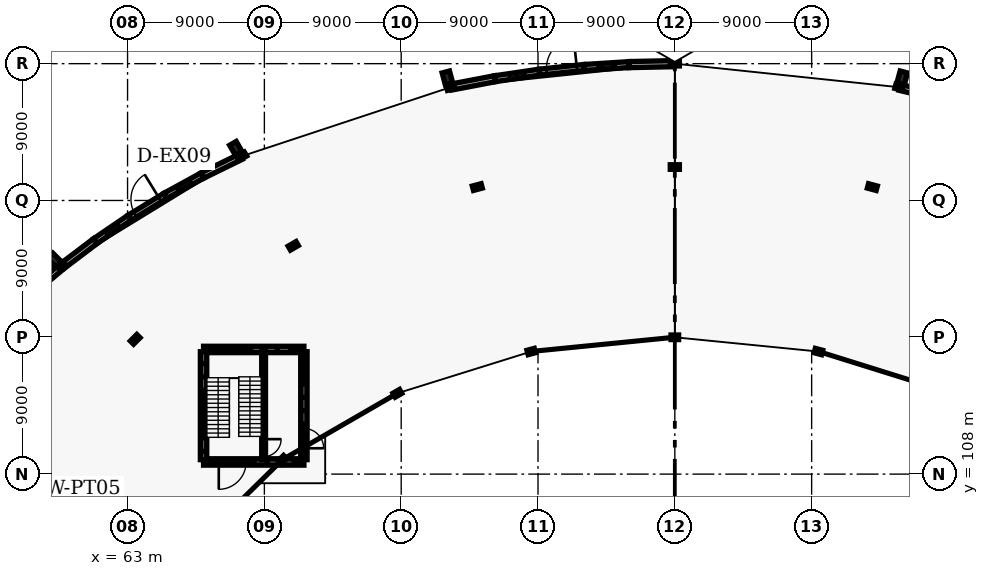
"""IFC4 building model, lengths in metres.
Left out: names, types, materials, properties, quantities, classifications, styles, units other than length and angle.
Written with IfcOpenShell. Run it as: python <this file> out.ifc"""

import sys

from ifc_helpers import new_model, si_unit, direction, frame, frame_2d, origin, origin_2d, place, context, subcontext, project, spatial, rectangle, i_section, extrude, element, fill, save


model = new_model("IFC4")
c1 = context("Model", 3, precision=1e-05, world=origin(), true_north=direction((0.0, 1.0)))
c2 = subcontext(c1, "Body", "Model", "MODEL_VIEW")
j1 = project(units=[si_unit("LENGTHUNIT", "METRE"), si_unit("PLANEANGLEUNIT", "RADIAN")], contexts=[c1])
p1 = place(None, origin())
s1 = spatial("IfcSite", under=j1, at=p1, CompositionType="ELEMENT")
p2 = place(p1, origin())
s2 = spatial("IfcBuilding", under=s1, at=p2, CompositionType="ELEMENT")
p3 = place(p2, origin())
s3 = spatial("IfcBuildingStorey", under=s2, at=p3, CompositionType="ELEMENT", Elevation=0.0)
p4 = place(p3, frame((108.447, 116.063, 0.0), z_axis=(0.0, 0.0, 1.0), x_axis=(0.258819045103, 0.965925826289, 0.0)))
e1 = element("IfcColumn", 1, at=p4, inside=s3, PredefinedType="COLUMN", context=c2, shape_type="SweptSolid", body=[
    extrude(i_section(OverallWidth=0.3, OverallDepth=0.5, WebThickness=0.014, FlangeThickness=0.028, FilletRadius=0.027, at=origin_2d()), origin(), (0.0, 0.0, 1.0), 5.4),
])
p5 = place(p3, frame((111.993, 126.881, 0.0), z_axis=(0.0, 0.0, 1.0), x_axis=(0.258819045103, 0.965925826289, 0.0)))
e2 = element("IfcColumn", 2, at=p5, inside=s3, PredefinedType="COLUMN", context=c2, shape_type="SweptSolid", body=[
    extrude(i_section(OverallWidth=0.3, OverallDepth=0.6, WebThickness=0.015, FlangeThickness=0.03, FilletRadius=0.027, at=origin_2d()), origin(), (0.0, 0.0, 1.0), 5.4),
])
p6 = place(p3, frame((113.753, 133.45, 0.0), z_axis=(0.0, 0.0, 1.0), x_axis=(0.258819045103, 0.965925826289, 0.0)))
e3 = element("IfcColumn", 3, at=p6, inside=s3, PredefinedType="COLUMN", context=c2, shape_type="SweptSolid", body=[
    extrude(i_section(OverallWidth=0.3, OverallDepth=0.5, WebThickness=0.014, FlangeThickness=0.028, FilletRadius=0.027, at=origin_2d()), origin(), (0.0, 0.0, 1.0), 5.4),
])
p7 = place(p3, frame((113.96, 134.066, 0.0), z_axis=(0.0, 0.0, 1.0), x_axis=(0.258819045103, 0.965925826289, 0.0)))
e4 = element("IfcColumn", 4, at=p7, inside=s3, PredefinedType="PILASTER", context=c2, shape_type="SweptSolid", body=[
    extrude(rectangle(XDim=0.8, YDim=0.5, at=origin_2d()), origin(), (0.0, 0.0, 1.0), 5.15),
])
p8 = place(p3, frame((99.0, 117.0, 0.0), z_axis=(0.0, 0.0, 1.0), x_axis=(0.0, 1.0, 0.0)))
e5 = element("IfcColumn", 5, at=p8, inside=s3, PredefinedType="COLUMN", context=c2, shape_type="SweptSolid", body=[
    extrude(i_section(OverallWidth=0.3, OverallDepth=0.5, WebThickness=0.014, FlangeThickness=0.028, FilletRadius=0.027, at=origin_2d()), origin(), (0.0, 0.0, 1.0), 5.4),
])
for number, where, z_axis, x_axis in (
    (6, (99.0, 128.2, 0.0), (0.0, 0.0, 1.0), (0.0, 1.0, 0.0)),
    (7, (99.0, 135.0, 0.0), (0.0, 0.0, 1.0), (0.0, 1.0, 0.0)),
):
    element("IfcColumn", number, at=place(p3, frame(where, z_axis=z_axis, x_axis=x_axis)), inside=s3, PredefinedType="COLUMN", context=c2, shape_type="SweptSolid", body=[
        extrude(i_section(OverallWidth=0.3, OverallDepth=0.6, WebThickness=0.015, FlangeThickness=0.03, FilletRadius=0.027, at=origin_2d()), origin(), (0.0, 0.0, 1.0), 5.4),
    ])
p9 = place(p3, frame((99.0, 135.65, 0.0), z_axis=(0.0, 0.0, 1.0), x_axis=(0.0, 1.0, 0.0)))
e8 = element("IfcColumn", 8, at=p9, inside=s3, PredefinedType="PILASTER", context=c2, shape_type="SweptSolid", body=[
    extrude(rectangle(XDim=0.75, YDim=0.5, at=origin_2d()), origin(), (0.0, 0.0, 1.0), 5.15),
])
p10 = place(p3, frame((89.553, 116.063, 0.0), z_axis=(0.0, 0.0, 1.0), x_axis=(-0.258819045103, 0.965925826289, 0.0)))
e9 = element("IfcColumn", 9, at=p10, inside=s3, PredefinedType="COLUMN", context=c2, shape_type="SweptSolid", body=[
    extrude(i_section(OverallWidth=0.3, OverallDepth=0.5, WebThickness=0.014, FlangeThickness=0.028, FilletRadius=0.027, at=origin_2d()), origin(), (0.0, 0.0, 1.0), 5.4),
])
p11 = place(p3, frame((86.007, 126.881, 0.0), z_axis=(0.0, 0.0, 1.0), x_axis=(-0.258819045103, 0.965925826289, 0.0)))
e10 = element("IfcColumn", 10, at=p11, inside=s3, PredefinedType="COLUMN", context=c2, shape_type="SweptSolid", body=[
    extrude(i_section(OverallWidth=0.3, OverallDepth=0.6, WebThickness=0.015, FlangeThickness=0.03, FilletRadius=0.027, at=origin_2d()), origin(), (0.0, 0.0, 1.0), 5.4),
])
p12 = place(p3, frame((84.247, 133.45, 0.0), z_axis=(0.0, 0.0, 1.0), x_axis=(-0.258819045103, 0.965925826289, 0.0)))
e11 = element("IfcColumn", 11, at=p12, inside=s3, PredefinedType="COLUMN", context=c2, shape_type="SweptSolid", body=[
    extrude(i_section(OverallWidth=0.3, OverallDepth=0.5, WebThickness=0.014, FlangeThickness=0.028, FilletRadius=0.027, at=origin_2d()), origin(), (0.0, 0.0, 1.0), 5.4),
])
p13 = place(p3, frame((84.04, 134.066, 0.0), z_axis=(0.0, 0.0, 1.0), x_axis=(-0.258819045103, 0.965925826289, 0.0)))
e12 = element("IfcColumn", 12, at=p13, inside=s3, PredefinedType="PILASTER", context=c2, shape_type="SweptSolid", body=[
    extrude(rectangle(XDim=0.8, YDim=0.5, at=origin_2d()), origin(), (0.0, 0.0, 1.0), 5.15),
])
p14 = place(p3, frame((80.75, 113.316, 0.0), z_axis=(0.0, 0.0, 1.0), x_axis=(-0.5, 0.866025403784, 0.0)))
e13 = element("IfcColumn", 13, at=p14, inside=s3, PredefinedType="COLUMN", context=c2, shape_type="SweptSolid", body=[
    extrude(i_section(OverallWidth=0.3, OverallDepth=0.5, WebThickness=0.014, FlangeThickness=0.028, FilletRadius=0.027, at=origin_2d()), origin(), (0.0, 0.0, 1.0), 5.4),
])
for number, where, z_axis, x_axis in (
    (14, (73.9, 123.015, 0.0), (0.0, 0.0, 1.0), (-0.5, 0.866, 0.0)),
    (15, (70.5, 128.904, 0.0), (0.0, 0.0, 1.0), (-0.5, 0.866, 0.0)),
):
    element("IfcColumn", number, at=place(p3, frame(where, z_axis=z_axis, x_axis=x_axis)), inside=s3, PredefinedType="COLUMN", context=c2, shape_type="SweptSolid", body=[
        extrude(i_section(OverallWidth=0.3, OverallDepth=0.6, WebThickness=0.015, FlangeThickness=0.03, FilletRadius=0.027, at=origin_2d()), origin(), (0.0, 0.0, 1.0), 5.4),
    ])
p15 = place(p3, frame((70.119, 129.431, 0.0), z_axis=(0.0, 0.0, 1.0), x_axis=(-0.5, 0.866025403784, 0.0)))
e16 = element("IfcColumn", 16, at=p15, inside=s3, PredefinedType="PILASTER", context=c2, shape_type="SweptSolid", body=[
    extrude(rectangle(XDim=0.75, YDim=0.5, at=origin_2d()), origin(), (0.0, 0.0, 1.0), 5.15),
])
p16 = place(p3, frame((73.191, 108.945, 0.0), z_axis=(0.0, 0.0, 1.0), x_axis=(-0.707106781187, 0.707106781187, 0.0)))
e17 = element("IfcColumn", 17, at=p16, inside=s3, PredefinedType="COLUMN", context=c2, shape_type="SweptSolid", body=[
    extrude(i_section(OverallWidth=0.3, OverallDepth=0.5, WebThickness=0.014, FlangeThickness=0.028, FilletRadius=0.027, at=origin_2d()), origin(), (0.0, 0.0, 1.0), 5.4),
])
p17 = place(p3, frame((63.503, 116.865, 0.0), z_axis=(0.0, 0.0, 1.0), x_axis=(-0.707106781187, 0.707106781187, 0.0)))
e18 = element("IfcColumn", 18, at=p17, inside=s3, PredefinedType="COLUMN", context=c2, shape_type="SweptSolid", body=[
    extrude(i_section(OverallWidth=0.3, OverallDepth=0.6, WebThickness=0.015, FlangeThickness=0.03, FilletRadius=0.027, at=origin_2d()), origin(), (0.0, 0.0, 1.0), 5.4),
])
p18 = place(p3, frame((58.695, 121.673, 0.0), z_axis=(0.0, 0.0, 1.0), x_axis=(-0.707106781187, 0.707106781187, 0.0)))
e19 = element("IfcColumn", 19, at=p18, inside=s3, PredefinedType="COLUMN", context=c2, shape_type="SweptSolid", body=[
    extrude(i_section(OverallWidth=0.3, OverallDepth=0.5, WebThickness=0.014, FlangeThickness=0.028, FilletRadius=0.027, at=origin_2d()), origin(), (0.0, 0.0, 1.0), 5.4),
])
p19 = place(p3, frame((58.187, 122.079, 0.0), z_axis=(0.0, 0.0, 1.0), x_axis=(-0.707106781187, 0.707106781187, 0.0)))
e20 = element("IfcColumn", 20, at=p19, inside=s3, PredefinedType="PILASTER", context=c2, shape_type="SweptSolid", body=[
    extrude(rectangle(XDim=0.8, YDim=0.5, at=origin_2d()), origin(), (0.0, 0.0, 1.0), 5.15),
])
p20 = place(p3, frame((116.637, 132.767, 0.0), z_axis=(0.0, 0.0, 1.0), x_axis=(-0.973061058114, 0.230547559481, 0.0)))
e21 = element("IfcWall", 21, at=p20, inside=s3, PredefinedType="SOLIDWALL", context=c2, shape_type="SweptSolid", body=[
    extrude(rectangle(XDim=2.923, YDim=0.4, at=frame_2d((1.461, 0.0))), origin(), (0.0, 0.0, 1.0), 4.6),
])
p21 = place(p3, frame((98.96, 135.0, 0.0), z_axis=(0.0, 0.0, 1.0), x_axis=(-0.999774733997, -0.021224543847, 0.0)))
e22 = element("IfcWall", 22, at=p21, inside=s3, PredefinedType="SOLIDWALL", context=c2, shape_type="SweptSolid", body=[
    extrude(rectangle(XDim=2.968, YDim=0.4, at=frame_2d((1.484, 0.0))), origin(), (0.0, 0.0, 1.0), 4.6),
])
p22 = place(p3, frame((95.993, 134.937, 0.0), z_axis=(0.0, 0.0, 1.0), x_axis=(-0.998008759952, -0.063075471132, 0.0)))
e23 = element("IfcWall", 23, at=p22, inside=s3, PredefinedType="SOLIDWALL", context=c2, shape_type="SweptSolid", body=[
    extrude(rectangle(XDim=2.965, YDim=0.39, at=frame_2d((1.482, 0.0))), origin(), (0.0, 0.0, 1.0), 4.6),
])
p23 = place(p22, frame((0.882, 0.0, 0.95)))
e24 = element("IfcOpeningElement", 24, at=p23, cuts=e23, PredefinedType="OPENING", context=c2, shape_type="SweptSolid", body=[
    extrude(rectangle(XDim=1.2, YDim=1.8, at=frame_2d((0.6, 0.9))), frame((0.0, 0.205, 0.0), z_axis=(0.0, -1.0, 0.0), x_axis=(1.0, 0.0, 0.0)), (0.0, 0.0, 1.0), 0.41),
])
p24 = place(p3, frame((93.034, 134.75, 0.0), z_axis=(0.0, 0.0, 1.0), x_axis=(-0.994529838675, -0.10445286011, 0.0)))
e25 = element("IfcWall", 25, at=p24, inside=s3, PredefinedType="SOLIDWALL", context=c2, shape_type="SweptSolid", body=[
    extrude(rectangle(XDim=2.959, YDim=0.39, at=frame_2d((1.479, 0.0))), origin(), (0.0, 0.0, 1.0), 4.6),
])
p25 = place(p24, frame((0.48, 0.0, 0.0)))
e26 = element("IfcOpeningElement", 26, at=p25, cuts=e25, PredefinedType="OPENING", context=c2, shape_type="SweptSolid", body=[
    extrude(rectangle(XDim=2.0, YDim=2.3, at=frame_2d((1.0, 1.15))), frame((0.0, 0.205, 0.0), z_axis=(0.0, -1.0, 0.0), x_axis=(1.0, 0.0, 0.0)), (0.0, 0.0, 1.0), 0.41),
])
p26 = place(p3, frame((90.091, 134.441, 0.0), z_axis=(0.0, 0.0, 1.0), x_axis=(-0.98927134979, -0.146089686444, 0.0)))
e27 = element("IfcWall", 27, at=p26, inside=s3, PredefinedType="SOLIDWALL", context=c2, shape_type="SweptSolid", body=[
    extrude(rectangle(XDim=2.95, YDim=0.39, at=frame_2d((1.475, 0.0))), origin(), (0.0, 0.0, 1.0), 4.6),
])
p27 = place(p26, frame((0.925, 0.0, 0.95)))
e28 = element("IfcOpeningElement", 28, at=p27, cuts=e27, PredefinedType="OPENING", context=c2, shape_type="SweptSolid", body=[
    extrude(rectangle(XDim=1.1, YDim=1.65, at=frame_2d((0.55, 0.825))), frame((0.0, 0.205, 0.0), z_axis=(0.0, -1.0, 0.0), x_axis=(1.0, 0.0, 0.0)), (0.0, 0.0, 1.0), 0.41),
])
p28 = place(p3, frame((87.173, 134.01, 0.0), z_axis=(0.0, 0.0, 1.0), x_axis=(-0.982209662349, -0.187787590612, 0.0)))
e29 = element("IfcWall", 29, at=p28, inside=s3, PredefinedType="SOLIDWALL", context=c2, shape_type="SweptSolid", body=[
    extrude(rectangle(XDim=2.939, YDim=0.4, at=frame_2d((1.47, 0.0))), origin(), (0.0, 0.0, 1.0), 4.6),
])
p29 = place(p3, frame((70.463, 128.887, 0.0), z_axis=(0.0, 0.0, 1.0), x_axis=(-0.898004688797, -0.439985884886, 0.0)))
e30 = element("IfcWall", 30, at=p29, inside=s3, PredefinedType="SOLIDWALL", context=c2, shape_type="SweptSolid", body=[
    extrude(rectangle(XDim=2.816, YDim=0.4, at=frame_2d((1.408, 0.0))), origin(), (0.0, 0.0, 1.0), 4.6),
])
p30 = place(p3, frame((67.934, 127.648, 0.0), z_axis=(0.0, 0.0, 1.0), x_axis=(-0.876631400762, -0.481162537193, 0.0)))
e31 = element("IfcWall", 31, at=p30, inside=s3, PredefinedType="SOLIDWALL", context=c2, shape_type="SweptSolid", body=[
    extrude(rectangle(XDim=2.789, YDim=0.39, at=frame_2d((1.395, 0.0))), origin(), (0.0, 0.0, 1.0), 4.6),
])
p31 = place(p30, frame((0.845, 0.0, 0.95)))
e32 = element("IfcOpeningElement", 32, at=p31, cuts=e31, PredefinedType="OPENING", context=c2, shape_type="SweptSolid", body=[
    extrude(rectangle(XDim=1.1, YDim=1.65, at=frame_2d((0.55, 0.825))), frame((0.0, 0.205, 0.0), z_axis=(0.0, -1.0, 0.0), x_axis=(1.0, 0.0, 0.0)), (0.0, 0.0, 1.0), 0.41),
])
p32 = place(p3, frame((65.489, 126.306, 0.0), z_axis=(0.0, 0.0, 1.0), x_axis=(-0.852743581926, -0.522329765075, 0.0)))
e33 = element("IfcWall", 33, at=p32, inside=s3, PredefinedType="SOLIDWALL", context=c2, shape_type="SweptSolid", body=[
    extrude(rectangle(XDim=2.76, YDim=0.39, at=frame_2d((1.38, 0.0))), origin(), (0.0, 0.0, 1.0), 4.6),
])
p33 = place(p32, frame((0.43, 0.0, 0.0)))
e34 = element("IfcOpeningElement", 34, at=p33, cuts=e33, PredefinedType="OPENING", context=c2, shape_type="SweptSolid", body=[
    extrude(rectangle(XDim=1.9, YDim=2.25, at=frame_2d((0.95, 1.125))), frame((0.0, 0.205, 0.0), z_axis=(0.0, -1.0, 0.0), x_axis=(1.0, 0.0, 0.0)), (0.0, 0.0, 1.0), 0.41),
])
p34 = place(p3, frame((63.135, 124.864, 0.0), z_axis=(0.0, 0.0, 1.0), x_axis=(-0.826422172457, -0.563050968271, 0.0)))
e35 = element("IfcWall", 35, at=p34, inside=s3, PredefinedType="SOLIDWALL", context=c2, shape_type="SweptSolid", body=[
    extrude(rectangle(XDim=2.73, YDim=0.39, at=frame_2d((1.365, 0.0))), origin(), (0.0, 0.0, 1.0), 4.6),
])
p35 = place(p34, frame((0.84, 0.0, 0.95)))
e36 = element("IfcOpeningElement", 36, at=p35, cuts=e35, PredefinedType="OPENING", context=c2, shape_type="SweptSolid", body=[
    extrude(rectangle(XDim=1.05, YDim=1.35, at=frame_2d((0.525, 0.675))), frame((0.0, 0.205, 0.0), z_axis=(0.0, -1.0, 0.0), x_axis=(1.0, 0.0, 0.0)), (0.0, 0.0, 1.0), 0.41),
])
p36 = place(p3, frame((60.879, 123.327, 0.0), z_axis=(0.0, 0.0, 1.0), x_axis=(-0.797585068324, -0.603206481054, 0.0)))
e37 = element("IfcWall", 37, at=p36, inside=s3, PredefinedType="SOLIDWALL", context=c2, shape_type="SweptSolid", body=[
    extrude(rectangle(XDim=2.7, YDim=0.4, at=frame_2d((1.35, 0.0))), origin(), (0.0, 0.0, 1.0), 4.6),
])
p37 = place(p3, frame((58.663, 121.648, 0.0), z_axis=(0.0, 0.0, 1.0), x_axis=(-0.76486611794, -0.644189274691, 0.0)))
e38 = element("IfcWall", 38, at=p37, inside=s3, PredefinedType="SOLIDWALL", context=c2, shape_type="SweptSolid", body=[
    extrude(rectangle(XDim=2.668, YDim=0.4, at=frame_2d((1.334, 0.0))), origin(), (0.0, 0.0, 1.0), 4.6),
])
p38 = place(p3, frame((68.0, 108.8, 0.0), z_axis=(0.0, 0.0, 1.0), x_axis=(1.0, 0.0, 0.0)))
e39 = element("IfcWall", 39, at=p38, inside=s3, PredefinedType="SHEAR", context=c2, shape_type="SweptSolid", body=[
    extrude(rectangle(XDim=6.6, YDim=0.42, at=frame_2d((3.3, 0.0))), origin(), (0.0, 0.0, 1.0), 5.4),
])
p39 = place(p38, frame((1.0, 0.0, 0.0)))
e40 = element("IfcOpeningElement", 40, at=p39, cuts=e39, PredefinedType="OPENING", context=c2, shape_type="SweptSolid", body=[
    extrude(rectangle(XDim=1.8, YDim=2.15, at=frame_2d((0.9, 1.075))), frame((0.0, 0.22, 0.0), z_axis=(0.0, -1.0, 0.0), x_axis=(1.0, 0.0, 0.0)), (0.0, 0.0, 1.0), 0.44),
])
p40 = place(p3, frame((68.0, 116.2, 0.0), z_axis=(0.0, 0.0, 1.0), x_axis=(1.0, 0.0, 0.0)))
e41 = element("IfcWall", 41, at=p40, inside=s3, PredefinedType="SHEAR", context=c2, shape_type="SweptSolid", body=[
    extrude(rectangle(XDim=6.6, YDim=0.42, at=frame_2d((3.3, 0.0))), origin(), (0.0, 0.0, 1.0), 5.4),
])
p41 = place(p3, frame((68.0, 108.95, 0.0), z_axis=(0.0, 0.0, 1.0), x_axis=(0.0, 1.0, 0.0)))
e42 = element("IfcWall", 42, at=p41, inside=s3, PredefinedType="SHEAR", context=c2, shape_type="SweptSolid", body=[
    extrude(rectangle(XDim=7.1, YDim=0.42, at=frame_2d((3.55, 0.0))), origin(), (0.0, 0.0, 1.0), 5.4),
])
p42 = place(p3, frame((74.6, 108.95, 0.0), z_axis=(0.0, 0.0, 1.0), x_axis=(0.0, 1.0, 0.0)))
e43 = element("IfcWall", 43, at=p42, inside=s3, PredefinedType="SHEAR", context=c2, shape_type="SweptSolid", body=[
    extrude(rectangle(XDim=7.1, YDim=0.42, at=frame_2d((3.55, 0.0))), origin(), (0.0, 0.0, 1.0), 5.4),
])
p43 = place(p42, frame((0.75, 0.0, 0.0)))
e44 = element("IfcOpeningElement", 44, at=p43, cuts=e43, PredefinedType="OPENING", context=c2, shape_type="SweptSolid", body=[
    extrude(rectangle(XDim=1.3, YDim=2.15, at=frame_2d((0.65, 1.075))), frame((0.0, 0.22, 0.0), z_axis=(0.0, -1.0, 0.0), x_axis=(1.0, 0.0, 0.0)), (0.0, 0.0, 1.0), 0.44),
])
p44 = place(p3, frame((71.95, 108.95, 0.0), z_axis=(0.0, 0.0, 1.0), x_axis=(0.0, 1.0, 0.0)))
e45 = element("IfcWall", 45, at=p44, inside=s3, PredefinedType="SHEAR", context=c2, shape_type="SweptSolid", body=[
    extrude(rectangle(XDim=7.1, YDim=0.25, at=frame_2d((3.55, 0.0))), origin(), (0.0, 0.0, 1.0), 5.4),
])
p45 = place(p44, frame((0.2, 0.0, 0.0)))
e46 = element("IfcOpeningElement", 46, at=p45, cuts=e45, PredefinedType="OPENING", context=c2, shape_type="SweptSolid", body=[
    extrude(rectangle(XDim=1.15, YDim=2.15, at=frame_2d((0.575, 1.075))), frame((0.0, 0.135, 0.0), z_axis=(0.0, -1.0, 0.0), x_axis=(1.0, 0.0, 0.0)), (0.0, 0.0, 1.0), 0.27),
])
p46 = place(p23, origin())
e47 = element("IfcWindow", 47, at=p46, inside=s3, PartitioningType="SINGLE_PANEL", PredefinedType="WINDOW", context=c2, shape_type="SweptSolid", body=[
    extrude(rectangle(XDim=1.2, YDim=1.8, at=frame_2d((0.6, 0.9))), frame((0.0, 0.03, 0.0), z_axis=(0.0, -1.0, 0.0), x_axis=(1.0, 0.0, 0.0)), (0.0, 0.0, 1.0), 0.06),
])
fill(e24, e47)
p47 = place(p25, frame((2.0, 0.0, 0.0), z_axis=(0.0, 0.0, 1.0), x_axis=(-1.0, 0.0, 0.0)))
e48 = element("IfcDoor", 48, at=p47, inside=s3, OperationType="DOUBLE_DOOR_SINGLE_SWING", PredefinedType="DOOR", context=c2, shape_type="SweptSolid", body=[
    extrude(rectangle(XDim=2.0, YDim=2.3, at=frame_2d((1.0, 1.15))), frame((0.0, 0.025, 0.0), z_axis=(0.0, -1.0, 0.0), x_axis=(1.0, 0.0, 0.0)), (0.0, 0.0, 1.0), 0.05),
])
fill(e26, e48)
p48 = place(p27, origin())
e49 = element("IfcWindow", 49, at=p48, inside=s3, PartitioningType="SINGLE_PANEL", PredefinedType="WINDOW", context=c2, shape_type="SweptSolid", body=[
    extrude(rectangle(XDim=1.1, YDim=1.65, at=frame_2d((0.55, 0.825))), frame((0.0, 0.03, 0.0), z_axis=(0.0, -1.0, 0.0), x_axis=(1.0, 0.0, 0.0)), (0.0, 0.0, 1.0), 0.06),
])
fill(e28, e49)
p49 = place(p31, origin())
e50 = element("IfcWindow", 50, at=p49, inside=s3, PartitioningType="SINGLE_PANEL", PredefinedType="WINDOW", context=c2, shape_type="SweptSolid", body=[
    extrude(rectangle(XDim=1.1, YDim=1.65, at=frame_2d((0.55, 0.825))), frame((0.0, 0.03, 0.0), z_axis=(0.0, -1.0, 0.0), x_axis=(1.0, 0.0, 0.0)), (0.0, 0.0, 1.0), 0.06),
])
fill(e32, e50)
p50 = place(p33, frame((1.9, 0.0, 0.0), z_axis=(0.0, 0.0, 1.0), x_axis=(-1.0, 0.0, 0.0)))
e51 = element("IfcDoor", 51, at=p50, inside=s3, OperationType="DOUBLE_DOOR_SINGLE_SWING", PredefinedType="DOOR", context=c2, shape_type="SweptSolid", body=[
    extrude(rectangle(XDim=1.9, YDim=2.25, at=frame_2d((0.95, 1.125))), frame((0.0, 0.025, 0.0), z_axis=(0.0, -1.0, 0.0), x_axis=(1.0, 0.0, 0.0)), (0.0, 0.0, 1.0), 0.05),
])
fill(e34, e51)
p51 = place(p35, origin())
e52 = element("IfcWindow", 52, at=p51, inside=s3, PartitioningType="SINGLE_PANEL", PredefinedType="WINDOW", context=c2, shape_type="SweptSolid", body=[
    extrude(rectangle(XDim=1.05, YDim=1.35, at=frame_2d((0.525, 0.675))), frame((0.0, 0.03, 0.0), z_axis=(0.0, -1.0, 0.0), x_axis=(1.0, 0.0, 0.0)), (0.0, 0.0, 1.0), 0.06),
])
fill(e36, e52)
p52 = place(p43, frame((1.3, 0.0, 0.0), z_axis=(0.0, 0.0, 1.0), x_axis=(-1.0, 0.0, 0.0)))
e53 = element("IfcDoor", 53, at=p52, inside=s3, OperationType="DOUBLE_DOOR_SINGLE_SWING", PredefinedType="DOOR", context=c2, shape_type="SweptSolid", body=[
    extrude(rectangle(XDim=1.3, YDim=2.15, at=frame_2d((0.65, 1.075))), frame((0.0, 0.025, 0.0), z_axis=(0.0, -1.0, 0.0), x_axis=(1.0, 0.0, 0.0)), (0.0, 0.0, 1.0), 0.05),
])
fill(e44, e53)
p53 = place(p45, origin())
e54 = element("IfcDoor", 54, at=p53, inside=s3, OperationType="SINGLE_SWING_RIGHT", PredefinedType="DOOR", context=c2, shape_type="SweptSolid", body=[
    extrude(rectangle(XDim=1.15, YDim=2.15, at=frame_2d((0.575, 1.075))), frame((0.0, 0.025, 0.0), z_axis=(0.0, -1.0, 0.0), x_axis=(1.0, 0.0, 0.0)), (0.0, 0.0, 1.0), 0.05),
])
fill(e46, e54)
p54 = place(p39, frame((1.8, 0.0, 0.0), z_axis=(0.0, 0.0, 1.0), x_axis=(-1.0, 0.0, 0.0)))
e55 = element("IfcDoor", 55, at=p54, inside=s3, OperationType="DOUBLE_DOOR_SINGLE_SWING", PredefinedType="DOOR", context=c2, shape_type="SweptSolid", body=[
    extrude(rectangle(XDim=1.8, YDim=2.15, at=frame_2d((0.9, 1.075))), frame((0.0, 0.025, 0.0), z_axis=(0.0, -1.0, 0.0), x_axis=(1.0, 0.0, 0.0)), (0.0, 0.0, 1.0), 0.05),
])
fill(e40, e55)
save(model, sys.argv[1])
